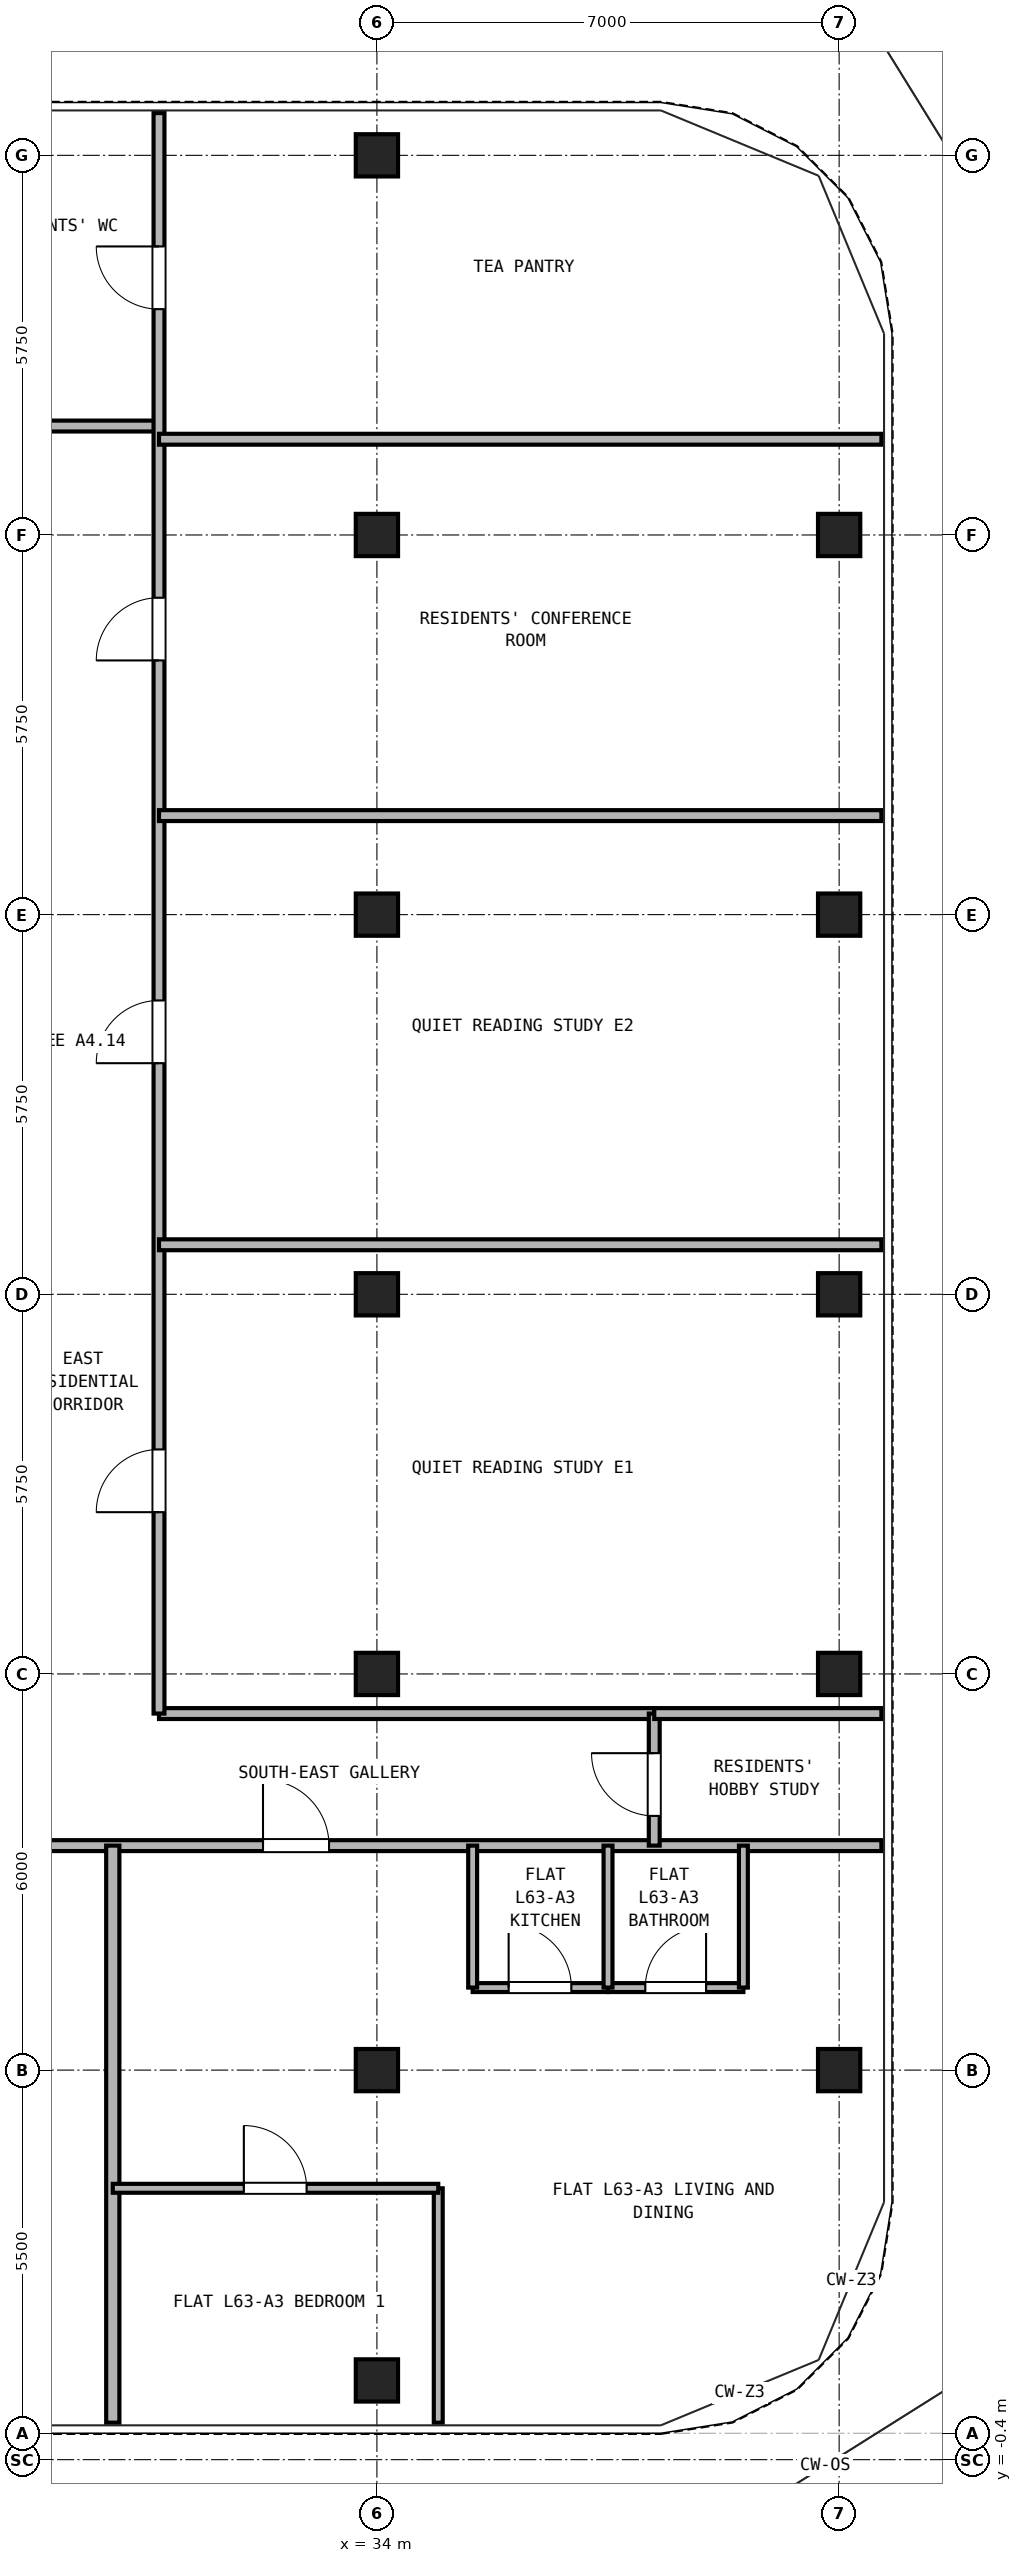
"""IFC4 building model, lengths in metres.
Left out: names, types, materials, properties, quantities, classifications, styles, units other than length and angle.
Written with IfcOpenShell. Run it as: python <this file> out.ifc"""

import sys

from ifc_helpers import new_model, si_unit, direction, frame, frame_2d, origin, origin_2d, place, context, subcontext, project, spatial, rectangle, hollow_rectangle, extrude, source, transform, mapped, element, fill, save


model = new_model("IFC4")
c1 = context("Model", 3, precision=1e-05, world=origin(), true_north=direction((0.0, 1.0)))
c2 = subcontext(c1, "Body", "Model", "MODEL_VIEW")
j1 = project(units=[si_unit("LENGTHUNIT", "METRE"), si_unit("PLANEANGLEUNIT", "RADIAN")], contexts=[c1])
p1 = place(None, origin())
s1 = spatial("IfcSite", under=j1, at=p1, CompositionType="ELEMENT")
p2 = place(p1, origin())
s2 = spatial("IfcBuilding", under=s1, at=p2, CompositionType="ELEMENT")
p3 = place(p2, frame((0.0, 0.0, 223.3)))
s3 = spatial("IfcBuildingStorey", under=s2, at=p3, CompositionType="ELEMENT", Elevation=223.3)
m1 = source(origin(), c2, "Body", "SweptSolid", [
    extrude(hollow_rectangle(XDim=0.64, YDim=0.64, WallThickness=0.035, at=origin_2d()), origin(), (0.0, 0.0, 1.0), 2.98),
])
for number, where, z_axis, x_axis in (
    (1, (34.0, 0.8, 0.0), (0.0, 0.0, 1.0), (1.0, 0.0, 0.0)),
    (2, (34.0, 34.5, 0.0), (0.0, 0.0, 1.0), (1.0, 0.0, 0.0)),
    (3, (41.0, 5.5, 0.0), (0.0, 0.0, 1.0), (1.0, 0.0, 0.0)),
    (4, (41.0, 11.5, 0.0), (0.0, 0.0, 1.0), (1.0, 0.0, 0.0)),
    (5, (41.0, 17.25, 0.0), (0.0, 0.0, 1.0), (1.0, 0.0, 0.0)),
    (6, (41.0, 23.0, 0.0), (0.0, 0.0, 1.0), (1.0, 0.0, 0.0)),
    (7, (41.0, 28.75, 0.0), (0.0, 0.0, 1.0), (1.0, 0.0, 0.0)),
    (8, (34.0, 5.5, 0.0), (0.0, 0.0, 1.0), (1.0, 0.0, 0.0)),
    (9, (34.0, 11.5, 0.0), (0.0, 0.0, 1.0), (1.0, 0.0, 0.0)),
    (10, (34.0, 17.25, 0.0), (0.0, 0.0, 1.0), (1.0, 0.0, 0.0)),
    (11, (34.0, 23.0, 0.0), (0.0, 0.0, 1.0), (1.0, 0.0, 0.0)),
    (12, (34.0, 28.75, 0.0), (0.0, 0.0, 1.0), (1.0, 0.0, 0.0)),
):
    element("IfcColumn", number, at=place(p3, frame(where, z_axis=z_axis, x_axis=x_axis)), inside=s3, PredefinedType="COLUMN", context=c2, shape_type="MappedRepresentation", body=[
        mapped(m1, transform((0.0, 0.0, 0.0), x_axis=(1.0, 0.0, 0.0), y_axis=(0.0, 1.0, 0.0), z_axis=(0.0, 0.0, 1.0), scale=1.0)),
    ])
p4 = place(p3, frame((5.36, 8.9, 0.0), z_axis=(0.0, 0.0, 1.0), x_axis=(1.0, 0.0, 0.0)))
e13 = element("IfcWall", 13, at=p4, inside=s3, PredefinedType="PARTITIONING", context=c2, shape_type="SweptSolid", body=[
    extrude(rectangle(XDim=36.28, YDim=0.165, at=frame_2d((18.14, 0.0))), origin(), (0.0, 0.0, 1.0), 2.98),
])
p5 = place(p4, frame((8.865, 0.0, 0.0)))
e14 = element("IfcOpeningElement", 14, at=p5, cuts=e13, PredefinedType="OPENING", context=c2, shape_type="SweptSolid", body=[
    extrude(rectangle(XDim=1.0, YDim=2.15, at=frame_2d((0.5, 1.075))), frame((0.0, 0.093, 0.0), z_axis=(0.0, -1.0, 0.0), x_axis=(1.0, 0.0, 0.0)), (0.0, 0.0, 1.0), 0.185),
])
p6 = place(p4, frame((14.665, 0.0, 0.0)))
e15 = element("IfcOpeningElement", 15, at=p6, cuts=e13, PredefinedType="OPENING", context=c2, shape_type="SweptSolid", body=[
    extrude(rectangle(XDim=1.0, YDim=2.15, at=frame_2d((0.5, 1.075))), frame((0.0, 0.093, 0.0), z_axis=(0.0, -1.0, 0.0), x_axis=(1.0, 0.0, 0.0)), (0.0, 0.0, 1.0), 0.185),
])
p7 = place(p4, frame((26.915, 0.0, 0.0)))
e16 = element("IfcOpeningElement", 16, at=p7, cuts=e13, PredefinedType="OPENING", context=c2, shape_type="SweptSolid", body=[
    extrude(rectangle(XDim=1.0, YDim=2.15, at=frame_2d((0.5, 1.075))), frame((0.0, 0.093, 0.0), z_axis=(0.0, -1.0, 0.0), x_axis=(1.0, 0.0, 0.0)), (0.0, 0.0, 1.0), 0.185),
])
p8 = place(p3, frame((30.7, 10.9, 0.0), z_axis=(0.0, 0.0, 1.0), x_axis=(1.0, 0.0, 0.0)))
e17 = element("IfcWall", 17, at=p8, inside=s3, PredefinedType="PARTITIONING", context=c2, shape_type="SweptSolid", body=[
    extrude(rectangle(XDim=7.5, YDim=0.165, at=frame_2d((3.75, 0.0))), origin(), (0.0, 0.0, 1.0), 2.98),
])
p9 = place(p3, frame((38.2, 8.9, 0.0), z_axis=(0.0, 0.0, 1.0), x_axis=(0.0, 1.0, 0.0)))
e18 = element("IfcWall", 18, at=p9, inside=s3, PredefinedType="PARTITIONING", context=c2, shape_type="SweptSolid", body=[
    extrude(rectangle(XDim=2.0, YDim=0.165, at=frame_2d((1.0, 0.0))), origin(), (0.0, 0.0, 1.0), 2.98),
])
p10 = place(p9, frame((0.45, 0.0, 0.0)))
e19 = element("IfcOpeningElement", 19, at=p10, cuts=e18, PredefinedType="OPENING", context=c2, shape_type="SweptSolid", body=[
    extrude(rectangle(XDim=0.95, YDim=2.15, at=frame_2d((0.475, 1.075))), frame((0.0, 0.093, 0.0), z_axis=(0.0, -1.0, 0.0), x_axis=(1.0, 0.0, 0.0)), (0.0, 0.0, 1.0), 0.185),
])
p11 = place(p3, frame((16.3, 30.4, 0.0), z_axis=(0.0, 0.0, 1.0), x_axis=(1.0, 0.0, 0.0)))
e20 = element("IfcWall", 20, at=p11, inside=s3, PredefinedType="PARTITIONING", context=c2, shape_type="SweptSolid", body=[
    extrude(rectangle(XDim=14.4, YDim=0.165, at=frame_2d((7.2, 0.0))), origin(), (0.0, 0.0, 1.0), 2.98),
])
p12 = place(p11, frame((2.35, 0.0, 0.0)))
e21 = element("IfcOpeningElement", 21, at=p12, cuts=e20, PredefinedType="OPENING", context=c2, shape_type="SweptSolid", body=[
    extrude(rectangle(XDim=0.95, YDim=2.15, at=frame_2d((0.475, 1.075))), frame((0.0, 0.093, 0.0), z_axis=(0.0, -1.0, 0.0), x_axis=(1.0, 0.0, 0.0)), (0.0, 0.0, 1.0), 0.185),
])
p13 = place(p11, frame((7.25, 0.0, 0.0)))
e22 = element("IfcOpeningElement", 22, at=p13, cuts=e20, PredefinedType="OPENING", context=c2, shape_type="SweptSolid", body=[
    extrude(rectangle(XDim=0.95, YDim=2.15, at=frame_2d((0.475, 1.075))), frame((0.0, 0.093, 0.0), z_axis=(0.0, -1.0, 0.0), x_axis=(1.0, 0.0, 0.0)), (0.0, 0.0, 1.0), 0.185),
])
p14 = place(p11, frame((11.6, 0.0, 0.0)))
e23 = element("IfcOpeningElement", 23, at=p14, cuts=e20, PredefinedType="OPENING", context=c2, shape_type="SweptSolid", body=[
    extrude(rectangle(XDim=0.92, YDim=2.1, at=frame_2d((0.46, 1.05))), frame((0.0, 0.093, 0.0), z_axis=(0.0, -1.0, 0.0), x_axis=(1.0, 0.0, 0.0)), (0.0, 0.0, 1.0), 0.185),
])
p15 = place(p3, frame((30.7, 10.9, 0.0), z_axis=(0.0, 0.0, 1.0), x_axis=(0.0, 1.0, 0.0)))
e24 = element("IfcWall", 24, at=p15, inside=s3, PredefinedType="PARTITIONING", context=c2, shape_type="SweptSolid", body=[
    extrude(rectangle(XDim=24.24, YDim=0.165, at=frame_2d((12.12, 0.0))), origin(), (0.0, 0.0, 1.0), 2.98),
])
p16 = place(p15, frame((3.05, 0.0, 0.0)))
e25 = element("IfcOpeningElement", 25, at=p16, cuts=e24, PredefinedType="OPENING", context=c2, shape_type="SweptSolid", body=[
    extrude(rectangle(XDim=0.95, YDim=2.15, at=frame_2d((0.475, 1.075))), frame((0.0, 0.093, 0.0), z_axis=(0.0, -1.0, 0.0), x_axis=(1.0, 0.0, 0.0)), (0.0, 0.0, 1.0), 0.185),
])
p17 = place(p15, frame((9.85, 0.0, 0.0)))
e26 = element("IfcOpeningElement", 26, at=p17, cuts=e24, PredefinedType="OPENING", context=c2, shape_type="SweptSolid", body=[
    extrude(rectangle(XDim=0.95, YDim=2.15, at=frame_2d((0.475, 1.075))), frame((0.0, 0.093, 0.0), z_axis=(0.0, -1.0, 0.0), x_axis=(1.0, 0.0, 0.0)), (0.0, 0.0, 1.0), 0.185),
])
p18 = place(p15, frame((15.95, 0.0, 0.0)))
e27 = element("IfcOpeningElement", 27, at=p18, cuts=e24, PredefinedType="OPENING", context=c2, shape_type="SweptSolid", body=[
    extrude(rectangle(XDim=0.95, YDim=2.15, at=frame_2d((0.475, 1.075))), frame((0.0, 0.093, 0.0), z_axis=(0.0, -1.0, 0.0), x_axis=(1.0, 0.0, 0.0)), (0.0, 0.0, 1.0), 0.185),
])
p19 = place(p15, frame((21.27, 0.0, 0.0)))
e28 = element("IfcOpeningElement", 28, at=p19, cuts=e24, PredefinedType="OPENING", context=c2, shape_type="SweptSolid", body=[
    extrude(rectangle(XDim=0.95, YDim=2.15, at=frame_2d((0.475, 1.075))), frame((0.0, 0.093, 0.0), z_axis=(0.0, -1.0, 0.0), x_axis=(1.0, 0.0, 0.0)), (0.0, 0.0, 1.0), 0.185),
])
p20 = place(p3, frame((30.0, 0.16, 0.0), z_axis=(0.0, 0.0, 1.0), x_axis=(0.0, 1.0, 0.0)))
e29 = element("IfcWall", 29, at=p20, inside=s3, PredefinedType="PARTITIONING", context=c2, shape_type="SweptSolid", body=[
    extrude(rectangle(XDim=8.74, YDim=0.2, at=frame_2d((4.37, 0.0))), origin(), (0.0, 0.0, 1.0), 2.98),
])
p21 = place(p3, frame((35.45, 6.75, 0.0), z_axis=(0.0, 0.0, 1.0), x_axis=(1.0, 0.0, 0.0)))
e30 = element("IfcWall", 30, at=p21, inside=s3, PredefinedType="PARTITIONING", context=c2, shape_type="SweptSolid", body=[
    extrude(rectangle(XDim=2.05, YDim=0.135, at=frame_2d((1.025, 0.0))), origin(), (0.0, 0.0, 1.0), 2.98),
])
p22 = place(p21, frame((0.545, 0.0, 0.0)))
e31 = element("IfcOpeningElement", 31, at=p22, cuts=e30, PredefinedType="OPENING", context=c2, shape_type="SweptSolid", body=[
    extrude(rectangle(XDim=0.95, YDim=2.15, at=frame_2d((0.475, 1.075))), frame((0.0, 0.077, 0.0), z_axis=(0.0, -1.0, 0.0), x_axis=(1.0, 0.0, 0.0)), (0.0, 0.0, 1.0), 0.155),
])
p23 = place(p3, frame((37.5, 6.75, 0.0), z_axis=(0.0, 0.0, 1.0), x_axis=(1.0, 0.0, 0.0)))
e32 = element("IfcWall", 32, at=p23, inside=s3, PredefinedType="PARTITIONING", context=c2, shape_type="SweptSolid", body=[
    extrude(rectangle(XDim=2.05, YDim=0.135, at=frame_2d((1.025, 0.0))), origin(), (0.0, 0.0, 1.0), 2.98),
])
p24 = place(p23, frame((0.565, 0.0, 0.0)))
e33 = element("IfcOpeningElement", 33, at=p24, cuts=e32, PredefinedType="OPENING", context=c2, shape_type="SweptSolid", body=[
    extrude(rectangle(XDim=0.92, YDim=2.1, at=frame_2d((0.46, 1.05))), frame((0.0, 0.077, 0.0), z_axis=(0.0, -1.0, 0.0), x_axis=(1.0, 0.0, 0.0)), (0.0, 0.0, 1.0), 0.155),
])
for number, where, z_axis, x_axis in (
    (34, (35.45, 6.75, 0.0), (0.0, 0.0, 1.0), (0.0, 1.0, 0.0)),
    (35, (37.5, 6.75, 0.0), (0.0, 0.0, 1.0), (0.0, 1.0, 0.0)),
    (36, (39.55, 6.75, 0.0), (0.0, 0.0, 1.0), (0.0, 1.0, 0.0)),
):
    element("IfcWall", number, at=place(p3, frame(where, z_axis=z_axis, x_axis=x_axis)), inside=s3, PredefinedType="PARTITIONING", context=c2, shape_type="SweptSolid", body=[
        extrude(rectangle(XDim=2.15, YDim=0.135, at=frame_2d((1.075, 0.0))), origin(), (0.0, 0.0, 1.0), 2.98),
    ])
p25 = place(p3, frame((34.929, 0.16, 0.0), z_axis=(0.0, 0.0, 1.0), x_axis=(0.0, 1.0, 0.0)))
e37 = element("IfcWall", 37, at=p25, inside=s3, PredefinedType="PARTITIONING", context=c2, shape_type="SweptSolid", body=[
    extrude(rectangle(XDim=3.55, YDim=0.135, at=frame_2d((1.775, 0.0))), origin(), (0.0, 0.0, 1.0), 2.98),
])
p26 = place(p3, frame((30.0, 3.71, 0.0), z_axis=(0.0, 0.0, 1.0), x_axis=(1.0, 0.0, 0.0)))
e38 = element("IfcWall", 38, at=p26, inside=s3, PredefinedType="PARTITIONING", context=c2, shape_type="SweptSolid", body=[
    extrude(rectangle(XDim=4.929, YDim=0.135, at=frame_2d((2.464, 0.0))), origin(), (0.0, 0.0, 1.0), 2.98),
])
p27 = place(p26, frame((1.985, 0.0, 0.0)))
e39 = element("IfcOpeningElement", 39, at=p27, cuts=e38, PredefinedType="OPENING", context=c2, shape_type="SweptSolid", body=[
    extrude(rectangle(XDim=0.95, YDim=2.15, at=frame_2d((0.475, 1.075))), frame((0.0, 0.077, 0.0), z_axis=(0.0, -1.0, 0.0), x_axis=(1.0, 0.0, 0.0)), (0.0, 0.0, 1.0), 0.155),
])
p28 = place(p3, frame((38.2, 10.9, 0.0), z_axis=(0.0, 0.0, 1.0), x_axis=(1.0, 0.0, 0.0)))
e40 = element("IfcWall", 40, at=p28, inside=s3, PredefinedType="PARTITIONING", context=c2, shape_type="SweptSolid", body=[
    extrude(rectangle(XDim=3.44, YDim=0.165, at=frame_2d((1.72, 0.0))), origin(), (0.0, 0.0, 1.0), 2.98),
])
for number, where, z_axis, x_axis in (
    (41, (30.7, 18.0, 0.0), (0.0, 0.0, 1.0), (1.0, 0.0, 0.0)),
    (42, (30.7, 24.5, 0.0), (0.0, 0.0, 1.0), (1.0, 0.0, 0.0)),
    (43, (30.7, 30.2, 0.0), (0.0, 0.0, 1.0), (1.0, 0.0, 0.0)),
):
    element("IfcWall", number, at=place(p3, frame(where, z_axis=z_axis, x_axis=x_axis)), inside=s3, PredefinedType="PARTITIONING", context=c2, shape_type="SweptSolid", body=[
        extrude(rectangle(XDim=10.94, YDim=0.165, at=frame_2d((5.47, 0.0))), origin(), (0.0, 0.0, 1.0), 2.98),
    ])
p29 = place(p22, origin())
e44 = element("IfcDoor", 44, at=p29, inside=s3, OperationType="SINGLE_SWING_LEFT", PredefinedType="DOOR", context=c2, shape_type="SweptSolid", body=[
    extrude(rectangle(XDim=0.95, YDim=2.15, at=frame_2d((0.475, 1.075))), frame((0.0, 0.025, 0.0), z_axis=(0.0, -1.0, 0.0), x_axis=(1.0, 0.0, 0.0)), (0.0, 0.0, 1.0), 0.05),
])
fill(e31, e44)
p30 = place(p24, origin())
e45 = element("IfcDoor", 45, at=p30, inside=s3, OperationType="SINGLE_SWING_RIGHT", PredefinedType="DOOR", context=c2, shape_type="SweptSolid", body=[
    extrude(rectangle(XDim=0.92, YDim=2.1, at=frame_2d((0.46, 1.05))), frame((0.0, 0.025, 0.0), z_axis=(0.0, -1.0, 0.0), x_axis=(1.0, 0.0, 0.0)), (0.0, 0.0, 1.0), 0.05),
])
fill(e33, e45)
p31 = place(p27, frame((0.95, 0.0, 0.0), z_axis=(0.0, 0.0, 1.0), x_axis=(-1.0, 0.0, 0.0)))
e46 = element("IfcDoor", 46, at=p31, inside=s3, OperationType="SINGLE_SWING_LEFT", PredefinedType="DOOR", context=c2, shape_type="SweptSolid", body=[
    extrude(rectangle(XDim=0.95, YDim=2.15, at=frame_2d((0.475, 1.075))), frame((0.0, 0.025, 0.0), z_axis=(0.0, -1.0, 0.0), x_axis=(1.0, 0.0, 0.0)), (0.0, 0.0, 1.0), 0.05),
])
fill(e39, e46)
p32 = place(p7, frame((1.0, 0.0, 0.0), z_axis=(0.0, 0.0, 1.0), x_axis=(-1.0, 0.0, 0.0)))
e47 = element("IfcDoor", 47, at=p32, inside=s3, OperationType="SINGLE_SWING_LEFT", PredefinedType="DOOR", context=c2, shape_type="SweptSolid", body=[
    extrude(rectangle(XDim=1.0, YDim=2.15, at=frame_2d((0.5, 1.075))), frame((0.0, 0.025, 0.0), z_axis=(0.0, -1.0, 0.0), x_axis=(1.0, 0.0, 0.0)), (0.0, 0.0, 1.0), 0.05),
])
fill(e16, e47)
p33 = place(p10, origin())
e48 = element("IfcDoor", 48, at=p33, inside=s3, OperationType="SINGLE_SWING_RIGHT", PredefinedType="DOOR", context=c2, shape_type="SweptSolid", body=[
    extrude(rectangle(XDim=0.95, YDim=2.15, at=frame_2d((0.475, 1.075))), frame((0.0, 0.025, 0.0), z_axis=(0.0, -1.0, 0.0), x_axis=(1.0, 0.0, 0.0)), (0.0, 0.0, 1.0), 0.05),
])
fill(e19, e48)
p34 = place(p16, origin())
e49 = element("IfcDoor", 49, at=p34, inside=s3, OperationType="SINGLE_SWING_LEFT", PredefinedType="DOOR", context=c2, shape_type="SweptSolid", body=[
    extrude(rectangle(XDim=0.95, YDim=2.15, at=frame_2d((0.475, 1.075))), frame((0.0, 0.025, 0.0), z_axis=(0.0, -1.0, 0.0), x_axis=(1.0, 0.0, 0.0)), (0.0, 0.0, 1.0), 0.05),
])
fill(e25, e49)
p35 = place(p17, origin())
e50 = element("IfcDoor", 50, at=p35, inside=s3, OperationType="SINGLE_SWING_LEFT", PredefinedType="DOOR", context=c2, shape_type="SweptSolid", body=[
    extrude(rectangle(XDim=0.95, YDim=2.15, at=frame_2d((0.475, 1.075))), frame((0.0, 0.025, 0.0), z_axis=(0.0, -1.0, 0.0), x_axis=(1.0, 0.0, 0.0)), (0.0, 0.0, 1.0), 0.05),
])
fill(e26, e50)
p36 = place(p18, origin())
e51 = element("IfcDoor", 51, at=p36, inside=s3, OperationType="SINGLE_SWING_LEFT", PredefinedType="DOOR", context=c2, shape_type="SweptSolid", body=[
    extrude(rectangle(XDim=0.95, YDim=2.15, at=frame_2d((0.475, 1.075))), frame((0.0, 0.025, 0.0), z_axis=(0.0, -1.0, 0.0), x_axis=(1.0, 0.0, 0.0)), (0.0, 0.0, 1.0), 0.05),
])
fill(e27, e51)
p37 = place(p19, origin())
e52 = element("IfcDoor", 52, at=p37, inside=s3, OperationType="SINGLE_SWING_RIGHT", PredefinedType="DOOR", context=c2, shape_type="SweptSolid", body=[
    extrude(rectangle(XDim=0.95, YDim=2.15, at=frame_2d((0.475, 1.075))), frame((0.0, 0.025, 0.0), z_axis=(0.0, -1.0, 0.0), x_axis=(1.0, 0.0, 0.0)), (0.0, 0.0, 1.0), 0.05),
])
fill(e28, e52)
save(model, sys.argv[1])
